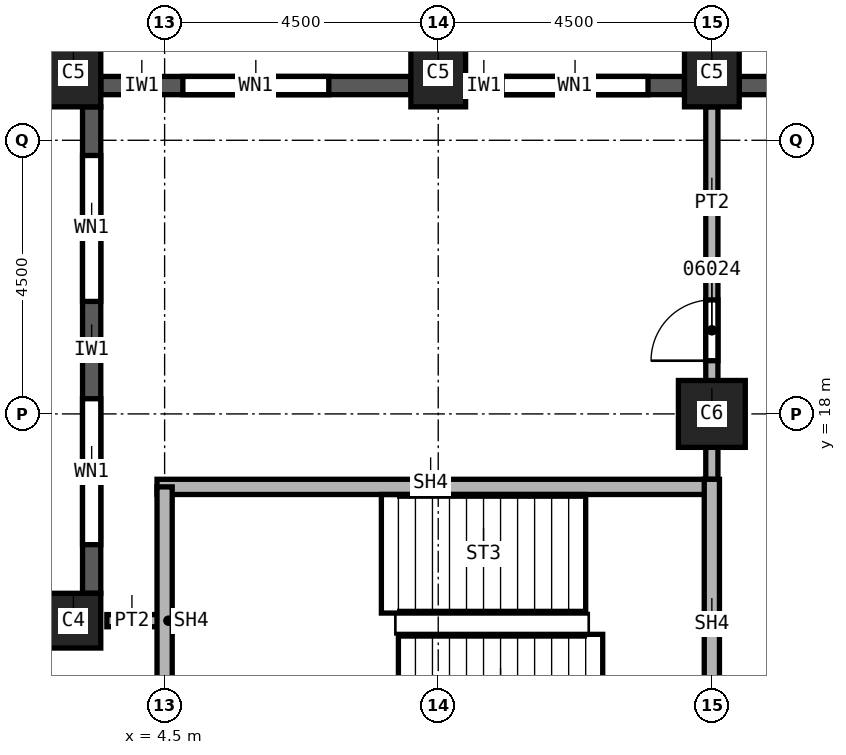
"""IFC4 building model, lengths in metres.
Left out: names, types, materials, properties, quantities, classifications, styles, units other than length and angle.
Written with IfcOpenShell. Run it as: python <this file> out.ifc"""

import sys

from ifc_helpers import new_model, si_unit, direction, frame, frame_2d, origin, origin_2d, place, context, subcontext, project, spatial, rectangle, extrude, element, fill, save


model = new_model("IFC4")
c1 = context("Model", 3, precision=1e-05, world=origin(), true_north=direction((0.0, 1.0)))
c2 = subcontext(c1, "Body", "Model", "MODEL_VIEW")
j1 = project(units=[si_unit("LENGTHUNIT", "METRE"), si_unit("PLANEANGLEUNIT", "RADIAN")], contexts=[c1])
p1 = place(None, origin())
s1 = spatial("IfcSite", under=j1, at=p1, CompositionType="ELEMENT")
p2 = place(p1, origin())
s2 = spatial("IfcBuilding", under=s1, at=p2, CompositionType="ELEMENT")
p3 = place(p2, frame((0.0, 0.0, 130.0)))
s3 = spatial("IfcBuildingStorey", under=s2, at=p3, CompositionType="ELEMENT", Elevation=130.0)
p4 = place(p3, frame((13.5, 18.0, 0.0), z_axis=(0.0, 0.0, 1.0), x_axis=(1.0, 0.0, 0.0)))
e1 = element("IfcColumn", 1, at=p4, inside=s3, PredefinedType="COLUMN", context=c2, shape_type="SweptSolid", body=[
    extrude(rectangle(XDim=1.1, YDim=1.1, at=origin_2d()), origin(), (0.0, 0.0, 1.0), 3.7),
])
for number, where, z_axis, x_axis in (
    (2, (3.0, 23.6, 0.0), (0.0, 0.0, 1.0), (1.0, 0.0, 0.0)),
    (3, (9.0, 23.6, 0.0), (0.0, 0.0, 1.0), (1.0, 0.0, 0.0)),
    (4, (13.5, 23.6, 0.0), (0.0, 0.0, 1.0), (1.0, 0.0, 0.0)),
):
    element("IfcColumn", number, at=place(p3, frame(where, z_axis=z_axis, x_axis=x_axis)), inside=s3, PredefinedType="COLUMN", context=c2, shape_type="SweptSolid", body=[
        extrude(rectangle(XDim=0.9, YDim=1.1, at=origin_2d()), origin(), (0.0, 0.0, 1.0), 3.7),
    ])
p5 = place(p3, frame((3.0, 14.6, 0.0), z_axis=(0.0, 0.0, 1.0), x_axis=(1.0, 0.0, 0.0)))
e5 = element("IfcColumn", 5, at=p5, inside=s3, PredefinedType="COLUMN", context=c2, shape_type="SweptSolid", body=[
    extrude(rectangle(XDim=0.9, YDim=0.9, at=origin_2d()), origin(), (0.0, 0.0, 1.0), 3.7),
])
p6 = place(p3, frame((17.55, 23.4, 0.0), z_axis=(0.0, 0.0, 1.0), x_axis=(-1.0, 0.0, 0.0)))
e6 = element("IfcWall", 6, at=p6, inside=s3, PredefinedType="SOLIDWALL", context=c2, shape_type="SweptSolid", body=[
    extrude(rectangle(XDim=3.6, YDim=0.3, at=frame_2d((1.8, 0.0))), origin(), (0.0, 0.0, 1.0), 3.1),
])
p7 = place(p6, frame((0.775, 0.0, 0.8)))
e7 = element("IfcOpeningElement", 7, at=p7, cuts=e6, PredefinedType="OPENING", context=c2, shape_type="SweptSolid", body=[
    extrude(rectangle(XDim=1.0, YDim=1.95, at=frame_2d((0.5, 0.975))), frame((0.0, 0.15, 0.0), z_axis=(0.0, -1.0, 0.0), x_axis=(1.0, 0.0, 0.0)), (0.0, 0.0, 1.0), 0.3),
])
p8 = place(p6, frame((2.375, 0.0, 0.8)))
e8 = element("IfcOpeningElement", 8, at=p8, cuts=e6, PredefinedType="OPENING", context=c2, shape_type="SweptSolid", body=[
    extrude(rectangle(XDim=0.6, YDim=1.95, at=frame_2d((0.3, 0.975))), frame((0.0, 0.15, 0.0), z_axis=(0.0, -1.0, 0.0), x_axis=(1.0, 0.0, 0.0)), (0.0, 0.0, 1.0), 0.3),
])
p9 = place(p3, frame((13.05, 23.4, 0.0), z_axis=(0.0, 0.0, 1.0), x_axis=(-1.0, 0.0, 0.0)))
e9 = element("IfcWall", 9, at=p9, inside=s3, PredefinedType="SOLIDWALL", context=c2, shape_type="SweptSolid", body=[
    extrude(rectangle(XDim=3.6, YDim=0.3, at=frame_2d((1.8, 0.0))), origin(), (0.0, 0.0, 1.0), 3.1),
])
p10 = place(p9, frame((0.6, 0.0, 0.8)))
e10 = element("IfcOpeningElement", 10, at=p10, cuts=e9, PredefinedType="OPENING", context=c2, shape_type="SweptSolid", body=[
    extrude(rectangle(XDim=2.4, YDim=1.95, at=frame_2d((1.2, 0.975))), frame((0.0, 0.15, 0.0), z_axis=(0.0, -1.0, 0.0), x_axis=(1.0, 0.0, 0.0)), (0.0, 0.0, 1.0), 0.3),
])
p11 = place(p3, frame((8.55, 23.4, 0.0), z_axis=(0.0, 0.0, 1.0), x_axis=(-1.0, 0.0, 0.0)))
e11 = element("IfcWall", 11, at=p11, inside=s3, PredefinedType="SOLIDWALL", context=c2, shape_type="SweptSolid", body=[
    extrude(rectangle(XDim=5.1, YDim=0.3, at=frame_2d((2.55, 0.0))), origin(), (0.0, 0.0, 1.0), 3.1),
])
p12 = place(p11, frame((1.35, 0.0, 0.8)))
e12 = element("IfcOpeningElement", 12, at=p12, cuts=e11, PredefinedType="OPENING", context=c2, shape_type="SweptSolid", body=[
    extrude(rectangle(XDim=2.4, YDim=1.95, at=frame_2d((1.2, 0.975))), frame((0.0, 0.15, 0.0), z_axis=(0.0, -1.0, 0.0), x_axis=(1.0, 0.0, 0.0)), (0.0, 0.0, 1.0), 0.3),
])
p13 = place(p3, frame((3.3, 23.05, 0.0), z_axis=(0.0, 0.0, 1.0), x_axis=(0.0, -1.0, 0.0)))
e13 = element("IfcWall", 13, at=p13, inside=s3, PredefinedType="SOLIDWALL", context=c2, shape_type="SweptSolid", body=[
    extrude(rectangle(XDim=8.0, YDim=0.3, at=frame_2d((4.0, 0.0))), origin(), (0.0, 0.0, 1.0), 3.1),
])
p14 = place(p13, frame((0.8, 0.0, 0.8)))
e14 = element("IfcOpeningElement", 14, at=p14, cuts=e13, PredefinedType="OPENING", context=c2, shape_type="SweptSolid", body=[
    extrude(rectangle(XDim=2.4, YDim=1.95, at=frame_2d((1.2, 0.975))), frame((0.0, 0.15, 0.0), z_axis=(0.0, -1.0, 0.0), x_axis=(1.0, 0.0, 0.0)), (0.0, 0.0, 1.0), 0.3),
])
p15 = place(p13, frame((4.8, 0.0, 0.8)))
e15 = element("IfcOpeningElement", 15, at=p15, cuts=e13, PredefinedType="OPENING", context=c2, shape_type="SweptSolid", body=[
    extrude(rectangle(XDim=2.4, YDim=1.95, at=frame_2d((1.2, 0.975))), frame((0.0, 0.15, 0.0), z_axis=(0.0, -1.0, 0.0), x_axis=(1.0, 0.0, 0.0)), (0.0, 0.0, 1.0), 0.3),
])
p16 = place(p3, frame((3.55, 14.6, 0.0), z_axis=(0.0, 0.0, 1.0), x_axis=(1.0, 0.0, 0.0)))
e16 = element("IfcWall", 16, at=p16, inside=s3, PredefinedType="PARTITIONING", context=c2, shape_type="SweptSolid", body=[
    extrude(rectangle(XDim=0.95, YDim=0.2, at=frame_2d((0.475, 0.0))), origin(), (0.0, 0.0, 1.0), 3.7),
])
p17 = place(p3, frame((13.5, 16.675, 0.0), z_axis=(0.0, 0.0, 1.0), x_axis=(0.0, 1.0, 0.0)))
e17 = element("IfcWall", 17, at=p17, inside=s3, PredefinedType="PARTITIONING", context=c2, shape_type="SweptSolid", body=[
    extrude(rectangle(XDim=6.375, YDim=0.2, at=frame_2d((3.188, 0.0))), origin(), (0.0, 0.0, 1.0), 3.7),
])
p18 = place(p17, frame((2.2, 0.0, 0.0)))
e18 = element("IfcOpeningElement", 18, at=p18, cuts=e17, PredefinedType="OPENING", context=c2, shape_type="SweptSolid", body=[
    extrude(rectangle(XDim=1.0, YDim=2.1, at=frame_2d((0.5, 1.05))), frame((0.0, 0.1, 0.0), z_axis=(0.0, -1.0, 0.0), x_axis=(1.0, 0.0, 0.0)), (0.0, 0.0, 1.0), 0.2),
])
p19 = place(p3, frame((4.375, 16.8, 0.0), z_axis=(0.0, 0.0, 1.0), x_axis=(1.0, 0.0, 0.0)))
e19 = element("IfcWall", 19, at=p19, inside=s3, PredefinedType="SOLIDWALL", context=c2, shape_type="SweptSolid", body=[
    extrude(rectangle(XDim=9.125, YDim=0.25, at=frame_2d((4.562, 0.0))), origin(), (0.0, 0.0, 1.0), 3.7),
])
p20 = place(p3, frame((4.5, 12.3, 0.0), z_axis=(0.0, 0.0, 1.0), x_axis=(0.0, 1.0, 0.0)))
e20 = element("IfcWall", 20, at=p20, inside=s3, PredefinedType="SOLIDWALL", context=c2, shape_type="SweptSolid", body=[
    extrude(rectangle(XDim=4.5, YDim=0.25, at=frame_2d((2.25, 0.0))), origin(), (0.0, 0.0, 1.0), 3.7),
])
p21 = place(p3, frame((13.5, 12.175, 0.0), z_axis=(0.0, 0.0, 1.0), x_axis=(0.0, 1.0, 0.0)))
e21 = element("IfcWall", 21, at=p21, inside=s3, PredefinedType="SOLIDWALL", context=c2, shape_type="SweptSolid", body=[
    extrude(rectangle(XDim=4.75, YDim=0.25, at=frame_2d((2.375, 0.0))), origin(), (0.0, 0.0, 1.0), 3.7),
])
p22 = place(p10, origin())
e22 = element("IfcWindow", 22, at=p22, inside=s3, PartitioningType="SINGLE_PANEL", PredefinedType="WINDOW", context=c2, shape_type="SweptSolid", body=[
    extrude(rectangle(XDim=2.4, YDim=1.95, at=frame_2d((1.2, 0.975))), frame((0.0, 0.03, 0.0), z_axis=(0.0, -1.0, 0.0), x_axis=(1.0, 0.0, 0.0)), (0.0, 0.0, 1.0), 0.06),
])
fill(e10, e22)
p23 = place(p12, origin())
e23 = element("IfcWindow", 23, at=p23, inside=s3, PartitioningType="SINGLE_PANEL", PredefinedType="WINDOW", context=c2, shape_type="SweptSolid", body=[
    extrude(rectangle(XDim=2.4, YDim=1.95, at=frame_2d((1.2, 0.975))), frame((0.0, 0.03, 0.0), z_axis=(0.0, -1.0, 0.0), x_axis=(1.0, 0.0, 0.0)), (0.0, 0.0, 1.0), 0.06),
])
fill(e12, e23)
p24 = place(p14, origin())
e24 = element("IfcWindow", 24, at=p24, inside=s3, PartitioningType="SINGLE_PANEL", PredefinedType="WINDOW", context=c2, shape_type="SweptSolid", body=[
    extrude(rectangle(XDim=2.4, YDim=1.95, at=frame_2d((1.2, 0.975))), frame((0.0, 0.03, 0.0), z_axis=(0.0, -1.0, 0.0), x_axis=(1.0, 0.0, 0.0)), (0.0, 0.0, 1.0), 0.06),
])
fill(e14, e24)
p25 = place(p15, origin())
e25 = element("IfcWindow", 25, at=p25, inside=s3, PartitioningType="SINGLE_PANEL", PredefinedType="WINDOW", context=c2, shape_type="SweptSolid", body=[
    extrude(rectangle(XDim=2.4, YDim=1.95, at=frame_2d((1.2, 0.975))), frame((0.0, 0.03, 0.0), z_axis=(0.0, -1.0, 0.0), x_axis=(1.0, 0.0, 0.0)), (0.0, 0.0, 1.0), 0.06),
])
fill(e15, e25)
p26 = place(p18, origin())
e26 = element("IfcDoor", 26, at=p26, inside=s3, OperationType="SINGLE_SWING_LEFT", PredefinedType="DOOR", context=c2, shape_type="SweptSolid", body=[
    extrude(rectangle(XDim=1.0, YDim=2.1, at=frame_2d((0.5, 1.05))), frame((0.0, 0.025, 0.0), z_axis=(0.0, -1.0, 0.0), x_axis=(1.0, 0.0, 0.0)), (0.0, 0.0, 1.0), 0.05),
])
fill(e18, e26)
save(model, sys.argv[1])
